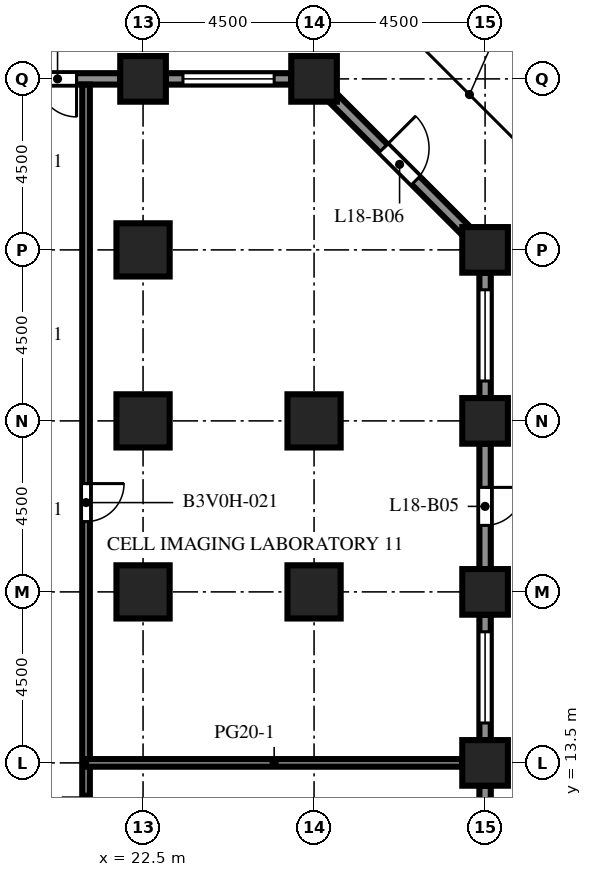
"""IFC4 building model, lengths in metres.
Left out: names, types, materials, properties, quantities, classifications, styles, units other than length and angle.
Written with IfcOpenShell. Run it as: python <this file> out.ifc"""

import sys

from ifc_helpers import new_model, si_unit, direction, frame, frame_2d, origin, origin_2d, place, context, subcontext, project, spatial, rectangle, extrude, element, fill, save


model = new_model("IFC4")
c1 = context("Model", 3, precision=1e-05, world=origin(), true_north=direction((0.0, 1.0)))
c2 = subcontext(c1, "Body", "Model", "MODEL_VIEW")
j1 = project(units=[si_unit("LENGTHUNIT", "METRE"), si_unit("PLANEANGLEUNIT", "RADIAN")], contexts=[c1])
p1 = place(None, origin())
s1 = spatial("IfcSite", under=j1, at=p1, CompositionType="ELEMENT")
p2 = place(p1, origin())
s2 = spatial("IfcBuilding", under=s1, at=p2, CompositionType="ELEMENT")
p3 = place(p2, frame((0.0, 0.0, 82.0)))
s3 = spatial("IfcBuildingStorey", under=s2, at=p3, CompositionType="ELEMENT", Elevation=82.0)
for number, where, z_axis, x_axis in (
    (1, (22.5, 31.5, -0.45), (0.0, 0.0, 1.0), (1.0, 0.0, 0.0)),
    (2, (27.0, 31.5, -0.45), (0.0, 0.0, 1.0), (1.0, 0.0, 0.0)),
):
    element("IfcColumn", number, at=place(p3, frame(where, z_axis=z_axis, x_axis=x_axis)), inside=s3, PredefinedType="COLUMN", context=c2, shape_type="SweptSolid", body=[
        extrude(rectangle(XDim=1.2, YDim=1.2, at=origin_2d()), origin(), (0.0, 0.0, 1.0), 4.55),
    ])
for number, where, z_axis, x_axis in (
    (3, (31.5, 13.5, 0.0), (0.0, 0.0, 1.0), (1.0, 0.0, 0.0)),
    (4, (31.5, 18.0, 0.0), (0.0, 0.0, 1.0), (1.0, 0.0, 0.0)),
    (5, (31.5, 22.5, 0.0), (0.0, 0.0, 1.0), (1.0, 0.0, 0.0)),
    (6, (31.5, 27.0, 0.0), (0.0, 0.0, 1.0), (1.0, 0.0, 0.0)),
):
    element("IfcColumn", number, at=place(p3, frame(where, z_axis=z_axis, x_axis=x_axis)), inside=s3, PredefinedType="COLUMN", context=c2, shape_type="SweptSolid", body=[
        extrude(rectangle(XDim=1.2, YDim=1.2, at=origin_2d()), origin(), (0.0, 0.0, 1.0), 4.1),
    ])
for number, where, z_axis, x_axis in (
    (7, (22.5, 18.0, 0.0), (0.0, 0.0, 1.0), (1.0, 0.0, 0.0)),
    (8, (22.5, 22.5, 0.0), (0.0, 0.0, 1.0), (1.0, 0.0, 0.0)),
    (9, (22.5, 27.0, 0.0), (0.0, 0.0, 1.0), (1.0, 0.0, 0.0)),
):
    element("IfcColumn", number, at=place(p3, frame(where, z_axis=z_axis, x_axis=x_axis)), inside=s3, PredefinedType="COLUMN", context=c2, shape_type="SweptSolid", body=[
        extrude(rectangle(XDim=1.4, YDim=1.4, at=origin_2d()), origin(), (0.0, 0.0, 1.0), 4.1),
    ])
for number, where, z_axis, x_axis in (
    (10, (27.0, 18.0, -0.45), (0.0, 0.0, 1.0), (1.0, 0.0, 0.0)),
    (11, (27.0, 22.5, -0.45), (0.0, 0.0, 1.0), (1.0, 0.0, 0.0)),
):
    element("IfcColumn", number, at=place(p3, frame(where, z_axis=z_axis, x_axis=x_axis)), inside=s3, PredefinedType="COLUMN", context=c2, shape_type="SweptSolid", body=[
        extrude(rectangle(XDim=1.4, YDim=1.4, at=origin_2d()), origin(), (0.0, 0.0, 1.0), 4.55),
    ])
p4 = place(p3, frame((31.5, 12.9, 0.0), z_axis=(0.0, 0.0, 1.0), x_axis=(0.0, -1.0, 0.0)))
e12 = element("IfcWall", 12, at=p4, inside=s3, PredefinedType="SOLIDWALL", context=c2, shape_type="SweptSolid", body=[
    extrude(rectangle(XDim=3.3, YDim=0.3, at=frame_2d((1.65, 0.0))), origin(), (0.0, 0.0, 1.0), 2.75),
])
p5 = place(p4, frame((0.45, 0.0, 0.8)))
e13 = element("IfcOpeningElement", 13, at=p5, cuts=e12, PredefinedType="OPENING", context=c2, shape_type="SweptSolid", body=[
    extrude(rectangle(XDim=2.4, YDim=1.7, at=frame_2d((1.2, 0.85))), frame((0.0, 0.16, 0.0), z_axis=(0.0, -1.0, 0.0), x_axis=(1.0, 0.0, 0.0)), (0.0, 0.0, 1.0), 0.32),
])
p6 = place(p3, frame((31.5, 17.4, 0.0), z_axis=(0.0, 0.0, 1.0), x_axis=(0.0, -1.0, 0.0)))
e14 = element("IfcWall", 14, at=p6, inside=s3, PredefinedType="SOLIDWALL", context=c2, shape_type="SweptSolid", body=[
    extrude(rectangle(XDim=3.3, YDim=0.3, at=frame_2d((1.65, 0.0))), origin(), (0.0, 0.0, 1.0), 2.75),
])
p7 = place(p6, frame((0.45, 0.0, 0.8)))
e15 = element("IfcOpeningElement", 15, at=p7, cuts=e14, PredefinedType="OPENING", context=c2, shape_type="SweptSolid", body=[
    extrude(rectangle(XDim=2.4, YDim=1.7, at=frame_2d((1.2, 0.85))), frame((0.0, 0.16, 0.0), z_axis=(0.0, -1.0, 0.0), x_axis=(1.0, 0.0, 0.0)), (0.0, 0.0, 1.0), 0.32),
])
p8 = place(p3, frame((31.5, 21.9, 0.0), z_axis=(0.0, 0.0, 1.0), x_axis=(0.0, -1.0, 0.0)))
e16 = element("IfcWall", 16, at=p8, inside=s3, PredefinedType="SOLIDWALL", context=c2, shape_type="SweptSolid", body=[
    extrude(rectangle(XDim=3.3, YDim=0.3, at=frame_2d((1.65, 0.0))), origin(), (0.0, 0.0, 1.0), 2.75),
])
p9 = place(p8, frame((1.15, 0.0, 0.0)))
e17 = element("IfcOpeningElement", 17, at=p9, cuts=e16, PredefinedType="OPENING", context=c2, shape_type="SweptSolid", body=[
    extrude(rectangle(XDim=1.0, YDim=2.2, at=frame_2d((0.5, 1.1))), frame((0.0, 0.16, 0.0), z_axis=(0.0, -1.0, 0.0), x_axis=(1.0, 0.0, 0.0)), (0.0, 0.0, 1.0), 0.32),
])
p10 = place(p3, frame((31.5, 26.4, 0.0), z_axis=(0.0, 0.0, 1.0), x_axis=(0.0, -1.0, 0.0)))
e18 = element("IfcWall", 18, at=p10, inside=s3, PredefinedType="SOLIDWALL", context=c2, shape_type="SweptSolid", body=[
    extrude(rectangle(XDim=3.3, YDim=0.3, at=frame_2d((1.65, 0.0))), origin(), (0.0, 0.0, 1.0), 2.75),
])
p11 = place(p10, frame((0.45, 0.0, 0.8)))
e19 = element("IfcOpeningElement", 19, at=p11, cuts=e18, PredefinedType="OPENING", context=c2, shape_type="SweptSolid", body=[
    extrude(rectangle(XDim=2.4, YDim=1.7, at=frame_2d((1.2, 0.85))), frame((0.0, 0.16, 0.0), z_axis=(0.0, -1.0, 0.0), x_axis=(1.0, 0.0, 0.0)), (0.0, 0.0, 1.0), 0.32),
])
p12 = place(p3, frame((27.494, 31.006, 0.0), z_axis=(0.0, 0.0, 1.0), x_axis=(0.707106781187, -0.707106781187, 0.0)))
e20 = element("IfcWall", 20, at=p12, inside=s3, PredefinedType="SOLIDWALL", context=c2, shape_type="SweptSolid", body=[
    extrude(rectangle(XDim=4.967, YDim=0.3, at=frame_2d((2.483, 0.0))), origin(), (0.0, 0.0, 1.0), 2.75),
])
p13 = place(p12, frame((1.884, 0.0, 0.0)))
e21 = element("IfcOpeningElement", 21, at=p13, cuts=e20, PredefinedType="OPENING", context=c2, shape_type="SweptSolid", body=[
    extrude(rectangle(XDim=1.2, YDim=2.2, at=frame_2d((0.6, 1.1))), frame((0.0, 0.16, 0.0), z_axis=(0.0, -1.0, 0.0), x_axis=(1.0, 0.0, 0.0)), (0.0, 0.0, 1.0), 0.32),
])
p14 = place(p3, frame((23.1, 31.5, 0.0), z_axis=(0.0, 0.0, 1.0), x_axis=(1.0, 0.0, 0.0)))
e22 = element("IfcWall", 22, at=p14, inside=s3, PredefinedType="SOLIDWALL", context=c2, shape_type="SweptSolid", body=[
    extrude(rectangle(XDim=3.3, YDim=0.3, at=frame_2d((1.65, 0.0))), origin(), (0.0, 0.0, 1.0), 2.75),
])
p15 = place(p14, frame((0.45, 0.0, 0.8)))
e23 = element("IfcOpeningElement", 23, at=p15, cuts=e22, PredefinedType="OPENING", context=c2, shape_type="SweptSolid", body=[
    extrude(rectangle(XDim=2.4, YDim=1.7, at=frame_2d((1.2, 0.85))), frame((0.0, 0.16, 0.0), z_axis=(0.0, -1.0, 0.0), x_axis=(1.0, 0.0, 0.0)), (0.0, 0.0, 1.0), 0.32),
])
p16 = place(p3, frame((18.6, 31.5, 0.0), z_axis=(0.0, 0.0, 1.0), x_axis=(1.0, 0.0, 0.0)))
e24 = element("IfcWall", 24, at=p16, inside=s3, PredefinedType="SOLIDWALL", context=c2, shape_type="SweptSolid", body=[
    extrude(rectangle(XDim=3.3, YDim=0.3, at=frame_2d((1.65, 0.0))), origin(), (0.0, 0.0, 1.0), 2.75),
])
p17 = place(p16, frame((1.15, 0.0, 0.0)))
e25 = element("IfcOpeningElement", 25, at=p17, cuts=e24, PredefinedType="OPENING", context=c2, shape_type="SweptSolid", body=[
    extrude(rectangle(XDim=1.0, YDim=2.2, at=frame_2d((0.5, 1.1))), frame((0.0, 0.16, 0.0), z_axis=(0.0, -1.0, 0.0), x_axis=(1.0, 0.0, 0.0)), (0.0, 0.0, 1.0), 0.32),
])
p18 = place(p3, frame((21.0, 31.35, 0.0), z_axis=(0.0, 0.0, 1.0), x_axis=(0.0, -1.0, 0.0)))
e26 = element("IfcWall", 26, at=p18, inside=s3, PredefinedType="PARTITIONING", context=c2, shape_type="SweptSolid", body=[
    extrude(rectangle(XDim=53.7, YDim=0.2, at=frame_2d((26.85, 0.0))), origin(), (0.0, 0.0, 1.0), 3.65),
])
p19 = place(p18, frame((47.5, 0.0, 0.0)))
e27 = element("IfcOpeningElement", 27, at=p19, cuts=e26, PredefinedType="OPENING", context=c2, shape_type="SweptSolid", body=[
    extrude(rectangle(XDim=1.0, YDim=2.1, at=frame_2d((0.5, 1.05))), frame((0.0, 0.11, 0.0), z_axis=(0.0, -1.0, 0.0), x_axis=(1.0, 0.0, 0.0)), (0.0, 0.0, 1.0), 0.22),
])
p20 = place(p18, frame((34.5, 0.0, 0.0)))
e28 = element("IfcOpeningElement", 28, at=p20, cuts=e26, PredefinedType="OPENING", context=c2, shape_type="SweptSolid", body=[
    extrude(rectangle(XDim=1.0, YDim=2.1, at=frame_2d((0.5, 1.05))), frame((0.0, 0.11, 0.0), z_axis=(0.0, -1.0, 0.0), x_axis=(1.0, 0.0, 0.0)), (0.0, 0.0, 1.0), 0.22),
])
p21 = place(p18, frame((26.0, 0.0, 0.0)))
e29 = element("IfcOpeningElement", 29, at=p21, cuts=e26, PredefinedType="OPENING", context=c2, shape_type="SweptSolid", body=[
    extrude(rectangle(XDim=1.0, YDim=2.1, at=frame_2d((0.5, 1.05))), frame((0.0, 0.11, 0.0), z_axis=(0.0, -1.0, 0.0), x_axis=(1.0, 0.0, 0.0)), (0.0, 0.0, 1.0), 0.22),
])
p22 = place(p18, frame((10.5, 0.0, 0.0)))
e30 = element("IfcOpeningElement", 30, at=p22, cuts=e26, PredefinedType="OPENING", context=c2, shape_type="SweptSolid", body=[
    extrude(rectangle(XDim=1.0, YDim=2.1, at=frame_2d((0.5, 1.05))), frame((0.0, 0.11, 0.0), z_axis=(0.0, -1.0, 0.0), x_axis=(1.0, 0.0, 0.0)), (0.0, 0.0, 1.0), 0.22),
])
p23 = place(p3, frame((21.0, 13.5, 0.0), z_axis=(0.0, 0.0, 1.0), x_axis=(1.0, 0.0, 0.0)))
e31 = element("IfcWall", 31, at=p23, inside=s3, PredefinedType="PARTITIONING", context=c2, shape_type="SweptSolid", body=[
    extrude(rectangle(XDim=9.9, YDim=0.2, at=frame_2d((4.95, 0.0))), origin(), (0.0, 0.0, 1.0), 3.65),
])
p24 = place(p7, origin())
e32 = element("IfcWindow", 32, at=p24, inside=s3, PartitioningType="SINGLE_PANEL", PredefinedType="WINDOW", context=c2, shape_type="SweptSolid", body=[
    extrude(rectangle(XDim=2.4, YDim=1.7, at=frame_2d((1.2, 0.85))), frame((0.0, 0.03, 0.0), z_axis=(0.0, -1.0, 0.0), x_axis=(1.0, 0.0, 0.0)), (0.0, 0.0, 1.0), 0.06),
])
fill(e15, e32)
p25 = place(p9, origin())
e33 = element("IfcDoor", 33, at=p25, inside=s3, OperationType="SINGLE_SWING_LEFT", PredefinedType="DOOR", context=c2, shape_type="SweptSolid", body=[
    extrude(rectangle(XDim=1.0, YDim=2.2, at=frame_2d((0.5, 1.1))), frame((0.0, 0.025, 0.0), z_axis=(0.0, -1.0, 0.0), x_axis=(1.0, 0.0, 0.0)), (0.0, 0.0, 1.0), 0.05),
])
fill(e17, e33)
p26 = place(p11, origin())
e34 = element("IfcWindow", 34, at=p26, inside=s3, PartitioningType="SINGLE_PANEL", PredefinedType="WINDOW", context=c2, shape_type="SweptSolid", body=[
    extrude(rectangle(XDim=2.4, YDim=1.7, at=frame_2d((1.2, 0.85))), frame((0.0, 0.03, 0.0), z_axis=(0.0, -1.0, 0.0), x_axis=(1.0, 0.0, 0.0)), (0.0, 0.0, 1.0), 0.06),
])
fill(e19, e34)
p27 = place(p13, origin())
e35 = element("IfcDoor", 35, at=p27, inside=s3, OperationType="SINGLE_SWING_LEFT", PredefinedType="DOOR", context=c2, shape_type="SweptSolid", body=[
    extrude(rectangle(XDim=1.2, YDim=2.2, at=frame_2d((0.6, 1.1))), frame((0.0, 0.025, 0.0), z_axis=(0.0, -1.0, 0.0), x_axis=(1.0, 0.0, 0.0)), (0.0, 0.0, 1.0), 0.05),
])
fill(e21, e35)
p28 = place(p15, origin())
e36 = element("IfcWindow", 36, at=p28, inside=s3, PartitioningType="SINGLE_PANEL", PredefinedType="WINDOW", context=c2, shape_type="SweptSolid", body=[
    extrude(rectangle(XDim=2.4, YDim=1.7, at=frame_2d((1.2, 0.85))), frame((0.0, 0.03, 0.0), z_axis=(0.0, -1.0, 0.0), x_axis=(1.0, 0.0, 0.0)), (0.0, 0.0, 1.0), 0.06),
])
fill(e23, e36)
p29 = place(p17, origin())
e37 = element("IfcDoor", 37, at=p29, inside=s3, OperationType="SINGLE_SWING_RIGHT", PredefinedType="DOOR", context=c2, shape_type="SweptSolid", body=[
    extrude(rectangle(XDim=1.0, YDim=2.2, at=frame_2d((0.5, 1.1))), frame((0.0, 0.025, 0.0), z_axis=(0.0, -1.0, 0.0), x_axis=(1.0, 0.0, 0.0)), (0.0, 0.0, 1.0), 0.05),
])
fill(e25, e37)
p30 = place(p22, origin())
e38 = element("IfcDoor", 38, at=p30, inside=s3, OperationType="SINGLE_SWING_LEFT", PredefinedType="DOOR", context=c2, shape_type="SweptSolid", body=[
    extrude(rectangle(XDim=1.0, YDim=2.1, at=frame_2d((0.5, 1.05))), frame((0.0, 0.025, 0.0), z_axis=(0.0, -1.0, 0.0), x_axis=(1.0, 0.0, 0.0)), (0.0, 0.0, 1.0), 0.05),
])
fill(e30, e38)
save(model, sys.argv[1])
